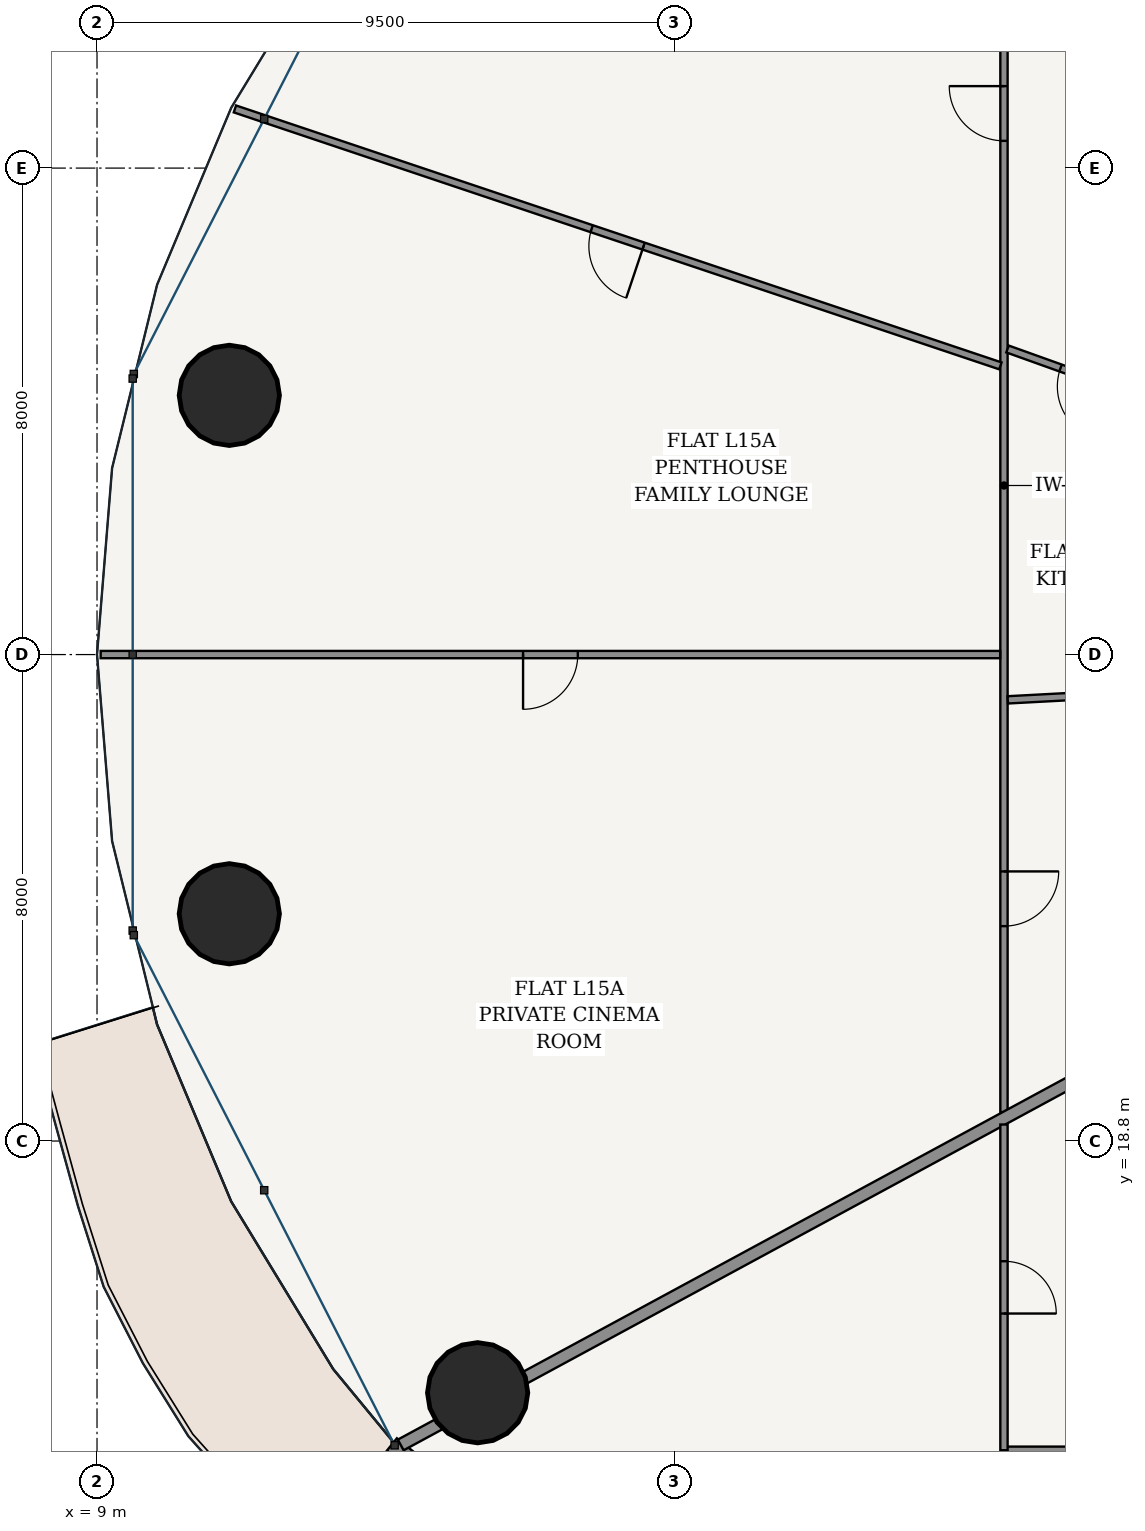
"""IFC4 building model, lengths in metres.
Left out: names, types, materials, properties, quantities, classifications, styles, units other than length and angle.
Written with IfcOpenShell. Run it as: python <this file> out.ifc"""

import sys

from ifc_helpers import new_model, si_unit, direction, frame, frame_2d, origin, origin_2d, place, context, subcontext, project, spatial, rectangle, hollow_circle, extrude, source, transform, mapped, element, fill, save


model = new_model("IFC4")
c1 = context("Model", 3, precision=1e-05, world=origin(), true_north=direction((-0.2419218956, 0.970295726276)))
c2 = subcontext(c1, "Body", "Model", "MODEL_VIEW")
j1 = project(units=[si_unit("LENGTHUNIT", "METRE"), si_unit("PLANEANGLEUNIT", "RADIAN")], contexts=[c1])
p1 = place(None, origin())
s1 = spatial("IfcSite", under=j1, at=p1, CompositionType="ELEMENT")
p2 = place(p1, origin())
s2 = spatial("IfcBuilding", under=s1, at=p2, CompositionType="ELEMENT")
p3 = place(p2, frame((0.0, 0.0, 60.0)))
s3 = spatial("IfcBuildingStorey", under=s2, at=p3, CompositionType="ELEMENT", Elevation=60.0)
for number, where, z_axis, x_axis in (
    (1, (11.176, 31.063, 0.0), (0.0, 0.0, 1.0), (1.0, 0.0, 0.0)),
    (2, (11.176, 22.537, 0.0), (0.0, 0.0, 1.0), (1.0, 0.0, 0.0)),
    (3, (15.259, 14.661, 0.0), (0.0, 0.0, 1.0), (1.0, 0.0, 0.0)),
):
    element("IfcColumn", number, at=place(p3, frame(where, z_axis=z_axis, x_axis=x_axis)), inside=s3, PredefinedType="COLUMN", context=c2, shape_type="SweptSolid", body=[
        extrude(hollow_circle(Radius=0.825, WallThickness=0.05, at=origin_2d()), origin(), (0.0, 0.0, 1.0), 3.6),
    ])
p4 = place(p3, frame((13.85, 13.811, 0.0), z_axis=(0.0, 0.0, 1.0), x_axis=(0.777016782851, -0.629479879875, 0.0)))
e4 = element("IfcWall", 4, at=p4, inside=s3, PredefinedType="SOLIDWALL", context=c2, shape_type="SweptSolid", body=[
    extrude(rectangle(XDim=10.447, YDim=0.26, at=frame_2d((5.223, 0.0))), origin(), (0.0, 0.0, 1.0), 3.32),
])
p5 = place(p4, frame((4.548, 0.0, 0.0)))
e5 = element("IfcOpeningElement", 5, at=p5, cuts=e4, PredefinedType="OPENING", context=c2, shape_type="SweptSolid", body=[
    extrude(rectangle(XDim=1.35, YDim=2.2, at=frame_2d((0.675, 1.1))), frame((0.0, 0.14, 0.0), z_axis=(0.0, -1.0, 0.0), x_axis=(1.0, 0.0, 0.0)), (0.0, 0.0, 1.0), 0.28),
])
p6 = place(p3, frame((23.915, 19.276, 0.0), z_axis=(0.0, 0.0, 1.0), x_axis=(0.0, 1.0, 0.0)))
e6 = element("IfcWall", 6, at=p6, inside=s3, PredefinedType="PARTITIONING", context=c2, shape_type="SweptSolid", body=[
    extrude(rectangle(XDim=20.609, YDim=0.12, at=frame_2d((10.305, 0.0))), origin(), (0.0, 0.0, 1.0), 2.688),
])
p7 = place(p6, frame((15.972, 0.0, 0.0)))
e7 = element("IfcOpeningElement", 7, at=p7, cuts=e6, PredefinedType="OPENING", context=c2, shape_type="SweptSolid", body=[
    extrude(rectangle(XDim=0.9, YDim=2.15, at=frame_2d((0.45, 1.075))), frame((0.0, 0.07, 0.0), z_axis=(0.0, -1.0, 0.0), x_axis=(1.0, 0.0, 0.0)), (0.0, 0.0, 1.0), 0.14),
])
p8 = place(p6, frame((3.058, 0.0, 0.0)))
e8 = element("IfcOpeningElement", 8, at=p8, cuts=e6, PredefinedType="OPENING", context=c2, shape_type="SweptSolid", body=[
    extrude(rectangle(XDim=0.9, YDim=2.15, at=frame_2d((0.45, 1.075))), frame((0.0, 0.07, 0.0), z_axis=(0.0, -1.0, 0.0), x_axis=(1.0, 0.0, 0.0)), (0.0, 0.0, 1.0), 0.14),
])
p9 = place(p3, frame((23.856, 31.547, 0.0), z_axis=(0.0, 0.0, 1.0), x_axis=(-0.948017487737, 0.318218231634, 0.0)))
e9 = element("IfcWall", 9, at=p9, inside=s3, PredefinedType="PARTITIONING", context=c2, shape_type="SweptSolid", body=[
    extrude(rectangle(XDim=13.279, YDim=0.12, at=frame_2d((6.639, 0.0))), origin(), (0.0, 0.0, 1.0), 2.762),
])
p10 = place(p9, frame((6.189, 0.0, 0.0)))
e10 = element("IfcOpeningElement", 10, at=p10, cuts=e9, PredefinedType="OPENING", context=c2, shape_type="SweptSolid", body=[
    extrude(rectangle(XDim=0.9, YDim=2.15, at=frame_2d((0.45, 1.075))), frame((0.0, 0.07, 0.0), z_axis=(0.0, -1.0, 0.0), x_axis=(1.0, 0.0, 0.0)), (0.0, 0.0, 1.0), 0.14),
])
p11 = place(p3, frame((23.853, 26.8, 0.0), z_axis=(0.0, 0.0, 1.0), x_axis=(-1.0, 0.0, 0.0)))
e11 = element("IfcWall", 11, at=p11, inside=s3, PredefinedType="PARTITIONING", context=c2, shape_type="SweptSolid", body=[
    extrude(rectangle(XDim=14.793, YDim=0.12, at=frame_2d((7.396, 0.0))), origin(), (0.0, 0.0, 1.0), 2.762),
])
p12 = place(p11, frame((6.947, 0.0, 0.0)))
e12 = element("IfcOpeningElement", 12, at=p12, cuts=e11, PredefinedType="OPENING", context=c2, shape_type="SweptSolid", body=[
    extrude(rectangle(XDim=0.9, YDim=2.15, at=frame_2d((0.45, 1.075))), frame((0.0, 0.07, 0.0), z_axis=(0.0, -1.0, 0.0), x_axis=(1.0, 0.0, 0.0)), (0.0, 0.0, 1.0), 0.14),
])
p13 = place(p3, frame((26.565, 30.896, 0.0), z_axis=(0.0, 0.0, 1.0), x_axis=(-0.941406362049, 0.337274460186, 0.0)))
e13 = element("IfcWall", 13, at=p13, inside=s3, PredefinedType="PARTITIONING", context=c2, shape_type="SweptSolid", body=[
    extrude(rectangle(XDim=2.753, YDim=0.12, at=frame_2d((1.376, 0.0))), origin(), (0.0, 0.0, 1.0), 3.32),
])
p14 = place(p13, frame((0.927, 0.0, 0.0)))
e14 = element("IfcOpeningElement", 14, at=p14, cuts=e13, PredefinedType="OPENING", context=c2, shape_type="SweptSolid", body=[
    extrude(rectangle(XDim=0.9, YDim=2.15, at=frame_2d((0.45, 1.075))), frame((0.0, 0.07, 0.0), z_axis=(0.0, -1.0, 0.0), x_axis=(1.0, 0.0, 0.0)), (0.0, 0.0, 1.0), 0.14),
])
p15 = place(p3, frame((26.565, 26.193, 0.0), z_axis=(0.0, 0.0, 1.0), x_axis=(-0.99859273586, -0.053033460078, 0.0)))
e15 = element("IfcWall", 15, at=p15, inside=s3, PredefinedType="PARTITIONING", context=c2, shape_type="SweptSolid", body=[
    extrude(rectangle(XDim=2.592, YDim=0.12, at=frame_2d((1.296, 0.0))), origin(), (0.0, 0.0, 1.0), 3.32),
])
p16 = place(p3, frame((26.565, 20.608, 0.0), z_axis=(0.0, 0.0, 1.0), x_axis=(-0.879369737803, -0.476139542819, 0.0)))
e16 = element("IfcWall", 16, at=p16, inside=s3, PredefinedType="PARTITIONING", context=c2, shape_type="SweptSolid", body=[
    extrude(rectangle(XDim=14.295, YDim=0.2, at=frame_2d((7.147, 0.0))), origin(), (0.0, 0.0, 1.0), 2.688),
])
p17 = place(p3, frame((52.085, 13.715, 0.0), z_axis=(0.0, 0.0, 1.0), x_axis=(-1.0, 0.0, 0.0)))
e17 = element("IfcWall", 17, at=p17, inside=s3, PredefinedType="PARTITIONING", context=c2, shape_type="SweptSolid", body=[
    extrude(rectangle(XDim=28.17, YDim=0.12, at=frame_2d((14.085, 0.0))), origin(), (0.0, 0.0, 1.0), 2.688),
])
p18 = place(p17, frame((12.891, 0.0, 0.0)))
e18 = element("IfcOpeningElement", 18, at=p18, cuts=e17, PredefinedType="OPENING", context=c2, shape_type="SweptSolid", body=[
    extrude(rectangle(XDim=0.9, YDim=2.15, at=frame_2d((0.45, 1.075))), frame((0.0, 0.07, 0.0), z_axis=(0.0, -1.0, 0.0), x_axis=(1.0, 0.0, 0.0)), (0.0, 0.0, 1.0), 0.14),
])
p19 = place(p3, frame((23.915, 13.715, 0.0), z_axis=(0.0, 0.0, 1.0), x_axis=(0.0, 1.0, 0.0)))
e19 = element("IfcWall", 19, at=p19, inside=s3, PredefinedType="PARTITIONING", context=c2, shape_type="SweptSolid", body=[
    extrude(rectangle(XDim=5.356, YDim=0.12, at=frame_2d((2.678, 0.0))), origin(), (0.0, 0.0, 1.0), 2.999),
])
p20 = place(p19, frame((2.248, 0.0, 0.0)))
e20 = element("IfcOpeningElement", 20, at=p20, cuts=e19, PredefinedType="OPENING", context=c2, shape_type="SweptSolid", body=[
    extrude(rectangle(XDim=0.86, YDim=2.15, at=frame_2d((0.43, 1.075))), frame((0.0, 0.07, 0.0), z_axis=(0.0, -1.0, 0.0), x_axis=(1.0, 0.0, 0.0)), (0.0, 0.0, 1.0), 0.14),
])
m1 = source(origin(), c2, "Body", "SweptSolid", [
    extrude(rectangle(XDim=0.9, YDim=2.15, at=frame_2d((0.45, 1.075))), frame((0.0, 0.025, 0.0), z_axis=(0.0, -1.0, 0.0), x_axis=(1.0, 0.0, 0.0)), (0.0, 0.0, 1.0), 0.05),
])
p21 = place(p14, origin())
e21 = element("IfcDoor", 21, at=p21, inside=s3, OperationType="SINGLE_SWING_LEFT", PredefinedType="DOOR", context=c2, shape_type="MappedRepresentation", body=[
    mapped(m1, transform((0.0, 0.0, 0.0), scale=1.0)),
])
fill(e14, e21)
p22 = place(p7, origin())
e22 = element("IfcDoor", 22, at=p22, inside=s3, OperationType="SINGLE_SWING_RIGHT", PredefinedType="DOOR", context=c2, shape_type="MappedRepresentation", body=[
    mapped(m1, transform((0.0, 0.0, 0.0), scale=1.0)),
])
fill(e7, e22)
p23 = place(p10, origin())
e23 = element("IfcDoor", 23, at=p23, inside=s3, OperationType="SINGLE_SWING_LEFT", PredefinedType="DOOR", context=c2, shape_type="MappedRepresentation", body=[
    mapped(m1, transform((0.0, 0.0, 0.0), scale=1.0)),
])
fill(e10, e23)
p24 = place(p12, origin())
e24 = element("IfcDoor", 24, at=p24, inside=s3, OperationType="SINGLE_SWING_RIGHT", PredefinedType="DOOR", context=c2, shape_type="MappedRepresentation", body=[
    mapped(m1, transform((0.0, 0.0, 0.0), scale=1.0)),
])
fill(e12, e24)
p25 = place(p8, frame((0.9, 0.0, 0.0), z_axis=(0.0, 0.0, 1.0), x_axis=(-1.0, 0.0, 0.0)))
e25 = element("IfcDoor", 25, at=p25, inside=s3, OperationType="SINGLE_SWING_LEFT", PredefinedType="DOOR", context=c2, shape_type="MappedRepresentation", body=[
    mapped(m1, transform((0.0, 0.0, 0.0), scale=1.0)),
])
fill(e8, e25)
m2 = source(origin(), c2, "Body", "SweptSolid", [
    extrude(rectangle(XDim=0.86, YDim=2.15, at=frame_2d((0.43, 1.075))), frame((0.0, 0.025, 0.0), z_axis=(0.0, -1.0, 0.0), x_axis=(1.0, 0.0, 0.0)), (0.0, 0.0, 1.0), 0.05),
])
p26 = place(p20, frame((0.86, 0.0, 0.0), z_axis=(0.0, 0.0, 1.0), x_axis=(-1.0, 0.0, 0.0)))
e26 = element("IfcDoor", 26, at=p26, inside=s3, OperationType="SINGLE_SWING_RIGHT", PredefinedType="DOOR", context=c2, shape_type="MappedRepresentation", body=[
    mapped(m2, transform((0.0, 0.0, 0.0), scale=1.0)),
])
fill(e20, e26)
save(model, sys.argv[1])
